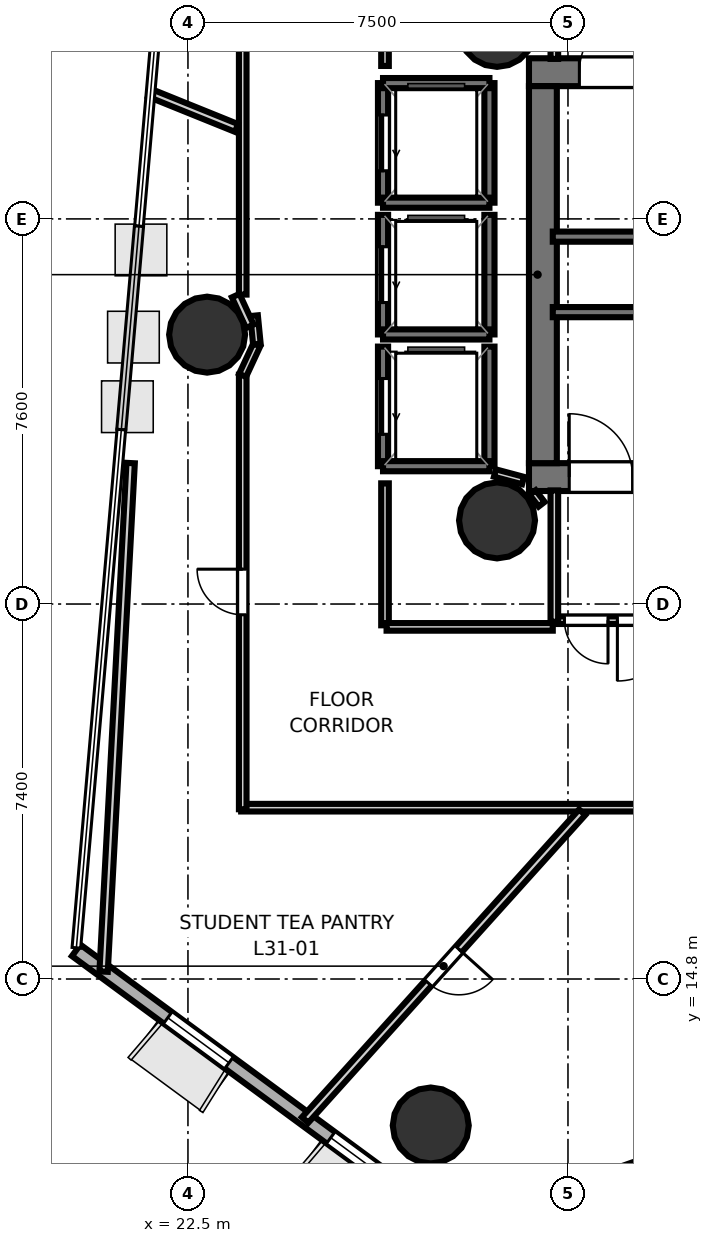
"""IFC4 building model, lengths in metres.
Left out: names, types, materials, properties, quantities, classifications, styles, units other than length and angle.
Written with IfcOpenShell. Run it as: python <this file> out.ifc"""

import sys

from ifc_helpers import new_model, si_unit, direction, frame, frame_2d, origin, origin_2d, place, context, subcontext, project, spatial, rectangle, hollow_circle, extrude, element, fill, save


model = new_model("IFC4")
c1 = context("Model", 3, precision=1e-05, world=origin(), true_north=direction((0.0, 1.0)))
c2 = subcontext(c1, "Body", "Model", "MODEL_VIEW")
j1 = project(units=[si_unit("LENGTHUNIT", "METRE"), si_unit("PLANEANGLEUNIT", "RADIAN")], contexts=[c1])
p1 = place(None, origin())
s1 = spatial("IfcSite", under=j1, at=p1, CompositionType="ELEMENT")
p2 = place(p1, origin())
s2 = spatial("IfcBuilding", under=s1, at=p2, CompositionType="ELEMENT")
p3 = place(p2, frame((0.0, 0.0, 123.7)))
s3 = spatial("IfcBuildingStorey", under=s2, at=p3, CompositionType="ELEMENT", Elevation=123.7)
p4 = place(p3, frame((29.23, 32.695, 0.0), z_axis=(0.0, 0.0, 1.0), x_axis=(1.0, 0.0, 0.0)))
e1 = element("IfcWall", 1, at=p4, inside=s3, PredefinedType="SHEAR", context=c2, shape_type="SweptSolid", body=[
    extrude(rectangle(XDim=10.62, YDim=0.55, at=frame_2d((5.31, 0.0))), origin(), (0.0, 0.0, 1.0), 3.52),
])
p5 = place(p4, frame((0.995, 0.0, 0.0)))
e2 = element("IfcOpeningElement", 2, at=p5, cuts=e1, PredefinedType="OPENING", context=c2, shape_type="SweptSolid", body=[
    extrude(rectangle(XDim=1.25, YDim=2.15, at=frame_2d((0.625, 1.075))), frame((0.0, 0.285, 0.0), z_axis=(0.0, -1.0, 0.0), x_axis=(1.0, 0.0, 0.0)), (0.0, 0.0, 1.0), 0.57),
])
p6 = place(p3, frame((29.23, 24.705, 0.0), z_axis=(0.0, 0.0, 1.0), x_axis=(1.0, 0.0, 0.0)))
e3 = element("IfcWall", 3, at=p6, inside=s3, PredefinedType="SHEAR", context=c2, shape_type="SweptSolid", body=[
    extrude(rectangle(XDim=10.62, YDim=0.55, at=frame_2d((5.31, 0.0))), origin(), (0.0, 0.0, 1.0), 3.52),
])
p7 = place(p6, frame((0.795, 0.0, 0.0)))
e4 = element("IfcOpeningElement", 4, at=p7, cuts=e3, PredefinedType="OPENING", context=c2, shape_type="SweptSolid", body=[
    extrude(rectangle(XDim=1.25, YDim=2.15, at=frame_2d((0.625, 1.075))), frame((0.0, 0.285, 0.0), z_axis=(0.0, -1.0, 0.0), x_axis=(1.0, 0.0, 0.0)), (0.0, 0.0, 1.0), 0.57),
])
p8 = place(p3, frame((29.505, 24.98, 0.0), z_axis=(0.0, 0.0, 1.0), x_axis=(0.0, 1.0, 0.0)))
e5 = element("IfcWall", 5, at=p8, inside=s3, PredefinedType="SHEAR", context=c2, shape_type="SweptSolid", body=[
    extrude(rectangle(XDim=7.44, YDim=0.55, at=frame_2d((3.72, 0.0))), origin(), (0.0, 0.0, 1.0), 3.52),
])
for number, where, z_axis, x_axis in (
    (6, (28.6, 33.55, 0.0), (0.0, 0.0, 1.0), (1.0, 0.0, 0.0)),
    (7, (28.6, 23.85, 0.0), (0.0, 0.0, 1.0), (1.0, 0.0, 0.0)),
    (8, (22.878, 27.516, 0.0), (0.0, 0.0, 1.0), (1.0, 0.0, 0.0)),
    (9, (27.292, 11.909, 0.0), (0.0, 0.0, 1.0), (1.0, 0.0, 0.0)),
):
    element("IfcColumn", number, at=place(p3, frame(where, z_axis=z_axis, x_axis=x_axis)), inside=s3, PredefinedType="COLUMN", context=c2, shape_type="SweptSolid", body=[
        extrude(hollow_circle(Radius=0.75, WallThickness=0.036, at=origin_2d()), origin(), (0.0, 0.0, 1.0), 3.7),
    ])
p9 = place(p3, frame((20.293, 15.366, 0.0), z_axis=(0.0, 0.0, 1.0), x_axis=(0.805460106815, -0.592649994794, 0.0)))
e10 = element("IfcWall", 10, at=p9, inside=s3, PredefinedType="SOLIDWALL", context=c2, shape_type="SweptSolid", body=[
    extrude(rectangle(XDim=9.983, YDim=0.28, at=frame_2d((4.992, 0.0))), origin(), (0.0, 0.0, 1.0), 3.52),
])
p10 = place(p9, frame((2.245, 0.0, 0.85)))
e11 = element("IfcOpeningElement", 11, at=p10, cuts=e10, PredefinedType="OPENING", context=c2, shape_type="SweptSolid", body=[
    extrude(rectangle(XDim=1.5, YDim=2.1, at=frame_2d((0.75, 1.05))), frame((0.0, 0.15, 0.0), z_axis=(0.0, -1.0, 0.0), x_axis=(1.0, 0.0, 0.0)), (0.0, 0.0, 1.0), 0.3),
])
p11 = place(p9, frame((6.238, 0.0, 0.85)))
e12 = element("IfcOpeningElement", 12, at=p11, cuts=e10, PredefinedType="OPENING", context=c2, shape_type="SweptSolid", body=[
    extrude(rectangle(XDim=1.5, YDim=2.1, at=frame_2d((0.75, 1.05))), frame((0.0, 0.15, 0.0), z_axis=(0.0, -1.0, 0.0), x_axis=(1.0, 0.0, 0.0)), (0.0, 0.0, 1.0), 0.3),
])
p12 = place(p3, frame((29.7, 29.45, 0.0), z_axis=(0.0, 0.0, 1.0), x_axis=(1.0, 0.0, 0.0)))
e13 = element("IfcWall", 13, at=p12, inside=s3, PredefinedType="SOLIDWALL", context=c2, shape_type="SweptSolid", body=[
    extrude(rectangle(XDim=8.3, YDim=0.2, at=frame_2d((4.15, 0.0))), origin(), (0.0, 0.0, 1.0), 3.52),
])
p13 = place(p3, frame((29.7, 27.96, 0.0), z_axis=(0.0, 0.0, 1.0), x_axis=(1.0, 0.0, 0.0)))
e14 = element("IfcWall", 14, at=p13, inside=s3, PredefinedType="SOLIDWALL", context=c2, shape_type="SweptSolid", body=[
    extrude(rectangle(XDim=7.75, YDim=0.2, at=frame_2d((3.875, 0.0))), origin(), (0.0, 0.0, 1.0), 3.52),
])
p14 = place(p3, frame((28.45, 30.12, 0.0), z_axis=(0.0, 0.0, 1.0), x_axis=(0.0, 1.0, 0.0)))
e15 = element("IfcWall", 15, at=p14, inside=s3, PredefinedType="SOLIDWALL", context=c2, shape_type="SweptSolid", body=[
    extrude(rectangle(XDim=2.36, YDim=0.2, at=frame_2d((1.18, 0.0))), origin(), (0.0, 0.0, 1.0), 3.52),
])
p15 = place(p3, frame((26.35, 30.12, 0.0), z_axis=(0.0, 0.0, 1.0), x_axis=(0.0, 1.0, 0.0)))
e16 = element("IfcWall", 16, at=p15, inside=s3, PredefinedType="SOLIDWALL", context=c2, shape_type="SweptSolid", body=[
    extrude(rectangle(XDim=2.36, YDim=0.2, at=frame_2d((1.18, 0.0))), origin(), (0.0, 0.0, 1.0), 3.52),
])
p16 = place(p15, frame((0.63, 0.0, 0.0)))
e17 = element("IfcOpeningElement", 17, at=p16, cuts=e16, PredefinedType="OPENING", context=c2, shape_type="SweptSolid", body=[
    extrude(rectangle(XDim=1.1, YDim=2.15, at=frame_2d((0.55, 1.075))), frame((0.0, 0.11, 0.0), z_axis=(0.0, -1.0, 0.0), x_axis=(1.0, 0.0, 0.0)), (0.0, 0.0, 1.0), 0.22),
])
for number, where, z_axis, x_axis in (
    (18, (26.35, 32.48, 0.0), (0.0, 0.0, 1.0), (1.0, 0.0, 0.0)),
    (19, (26.35, 30.12, 0.0), (0.0, 0.0, 1.0), (1.0, 0.0, 0.0)),
):
    element("IfcWall", number, at=place(p3, frame(where, z_axis=z_axis, x_axis=x_axis)), inside=s3, PredefinedType="SOLIDWALL", context=c2, shape_type="SweptSolid", body=[
        extrude(rectangle(XDim=2.1, YDim=0.2, at=frame_2d((1.05, 0.0))), origin(), (0.0, 0.0, 1.0), 3.52),
    ])
p17 = place(p3, frame((28.45, 27.52, 0.0), z_axis=(0.0, 0.0, 1.0), x_axis=(0.0, 1.0, 0.0)))
e20 = element("IfcWall", 20, at=p17, inside=s3, PredefinedType="SOLIDWALL", context=c2, shape_type="SweptSolid", body=[
    extrude(rectangle(XDim=2.36, YDim=0.2, at=frame_2d((1.18, 0.0))), origin(), (0.0, 0.0, 1.0), 3.52),
])
p18 = place(p3, frame((26.35, 27.52, 0.0), z_axis=(0.0, 0.0, 1.0), x_axis=(0.0, 1.0, 0.0)))
e21 = element("IfcWall", 21, at=p18, inside=s3, PredefinedType="SOLIDWALL", context=c2, shape_type="SweptSolid", body=[
    extrude(rectangle(XDim=2.36, YDim=0.2, at=frame_2d((1.18, 0.0))), origin(), (0.0, 0.0, 1.0), 3.52),
])
p19 = place(p18, frame((0.63, 0.0, 0.0)))
e22 = element("IfcOpeningElement", 22, at=p19, cuts=e21, PredefinedType="OPENING", context=c2, shape_type="SweptSolid", body=[
    extrude(rectangle(XDim=1.1, YDim=2.15, at=frame_2d((0.55, 1.075))), frame((0.0, 0.11, 0.0), z_axis=(0.0, -1.0, 0.0), x_axis=(1.0, 0.0, 0.0)), (0.0, 0.0, 1.0), 0.22),
])
p20 = place(p3, frame((26.35, 27.52, 0.0), z_axis=(0.0, 0.0, 1.0), x_axis=(1.0, 0.0, 0.0)))
e23 = element("IfcWall", 23, at=p20, inside=s3, PredefinedType="SOLIDWALL", context=c2, shape_type="SweptSolid", body=[
    extrude(rectangle(XDim=2.1, YDim=0.2, at=frame_2d((1.05, 0.0))), origin(), (0.0, 0.0, 1.0), 3.52),
])
p21 = place(p3, frame((28.45, 24.92, 0.0), z_axis=(0.0, 0.0, 1.0), x_axis=(0.0, 1.0, 0.0)))
e24 = element("IfcWall", 24, at=p21, inside=s3, PredefinedType="SOLIDWALL", context=c2, shape_type="SweptSolid", body=[
    extrude(rectangle(XDim=2.36, YDim=0.2, at=frame_2d((1.18, 0.0))), origin(), (0.0, 0.0, 1.0), 3.52),
])
p22 = place(p3, frame((26.35, 24.92, 0.0), z_axis=(0.0, 0.0, 1.0), x_axis=(0.0, 1.0, 0.0)))
e25 = element("IfcWall", 25, at=p22, inside=s3, PredefinedType="SOLIDWALL", context=c2, shape_type="SweptSolid", body=[
    extrude(rectangle(XDim=2.36, YDim=0.2, at=frame_2d((1.18, 0.0))), origin(), (0.0, 0.0, 1.0), 3.52),
])
p23 = place(p22, frame((0.63, 0.0, 0.0)))
e26 = element("IfcOpeningElement", 26, at=p23, cuts=e25, PredefinedType="OPENING", context=c2, shape_type="SweptSolid", body=[
    extrude(rectangle(XDim=1.1, YDim=2.15, at=frame_2d((0.55, 1.075))), frame((0.0, 0.11, 0.0), z_axis=(0.0, -1.0, 0.0), x_axis=(1.0, 0.0, 0.0)), (0.0, 0.0, 1.0), 0.22),
])
p24 = place(p3, frame((26.35, 24.92, 0.0), z_axis=(0.0, 0.0, 1.0), x_axis=(1.0, 0.0, 0.0)))
e27 = element("IfcWall", 27, at=p24, inside=s3, PredefinedType="SOLIDWALL", context=c2, shape_type="SweptSolid", body=[
    extrude(rectangle(XDim=2.1, YDim=0.2, at=frame_2d((1.05, 0.0))), origin(), (0.0, 0.0, 1.0), 3.52),
])
p25 = place(p3, frame((29.731, 32.958, 0.0), z_axis=(0.0, 0.0, 1.0), x_axis=(0.0, 1.0, 0.0)))
e28 = element("IfcWall", 28, at=p25, inside=s3, PredefinedType="PARTITIONING", context=c2, shape_type="SweptSolid", body=[
    extrude(rectangle(XDim=2.562, YDim=0.15, at=frame_2d((1.281, 0.0))), origin(), (0.0, 0.0, 1.0), 2.84),
])
p26 = place(p3, frame((33.45, 21.881, 0.0), z_axis=(0.0, 0.0, 1.0), x_axis=(-1.0, 0.0, 0.0)))
e29 = element("IfcWall", 29, at=p26, inside=s3, PredefinedType="PARTITIONING", context=c2, shape_type="SweptSolid", body=[
    extrude(rectangle(XDim=3.75, YDim=0.15, at=frame_2d((1.875, 0.0))), origin(), (0.0, 0.0, 1.0), 2.84),
])
p27 = place(p26, frame((1.275, 0.0, 0.0)))
e30 = element("IfcOpeningElement", 30, at=p27, cuts=e29, PredefinedType="OPENING", context=c2, shape_type="SweptSolid", body=[
    extrude(rectangle(XDim=1.2, YDim=2.15, at=frame_2d((0.6, 1.075))), frame((0.0, 0.085, 0.0), z_axis=(0.0, -1.0, 0.0), x_axis=(1.0, 0.0, 0.0)), (0.0, 0.0, 1.0), 0.17),
])
p28 = place(p26, frame((2.66, 0.0, 0.0)))
e31 = element("IfcOpeningElement", 31, at=p28, cuts=e29, PredefinedType="OPENING", context=c2, shape_type="SweptSolid", body=[
    extrude(rectangle(XDim=0.86, YDim=2.05, at=frame_2d((0.43, 1.025))), frame((0.0, 0.085, 0.0), z_axis=(0.0, -1.0, 0.0), x_axis=(1.0, 0.0, 0.0)), (0.0, 0.0, 1.0), 0.17),
])
p29 = place(p3, frame((29.731, 21.85, 0.0), z_axis=(0.0, 0.0, 1.0), x_axis=(0.0, 1.0, 0.0)))
e32 = element("IfcWall", 32, at=p29, inside=s3, PredefinedType="PARTITIONING", context=c2, shape_type="SweptSolid", body=[
    extrude(rectangle(XDim=2.592, YDim=0.15, at=frame_2d((1.296, 0.0))), origin(), (0.0, 0.0, 1.0), 2.84),
])
p30 = place(p3, frame((29.48, 24.169, 0.0), z_axis=(0.0, 0.0, 1.0), x_axis=(-0.608043045279, 0.79390405912, 0.0)))
e33 = element("IfcWall", 33, at=p30, inside=s3, PredefinedType="PARTITIONING", context=c2, shape_type="SweptSolid", body=[
    extrude(rectangle(XDim=0.29, YDim=0.15, at=frame_2d((0.145, 0.0))), origin(), (0.0, 0.0, 1.0), 2.84),
])
p31 = place(p3, frame((29.114, 24.637, 0.0), z_axis=(0.0, 0.0, 1.0), x_axis=(-0.966199685486, 0.257794817183, 0.0)))
e34 = element("IfcWall", 34, at=p31, inside=s3, PredefinedType="PARTITIONING", context=c2, shape_type="SweptSolid", body=[
    extrude(rectangle(XDim=0.575, YDim=0.15, at=frame_2d((0.288, 0.0))), origin(), (0.0, 0.0, 1.0), 2.84),
])
p32 = place(p3, frame((23.581, 28.307, 0.0), z_axis=(0.0, 0.0, 1.0), x_axis=(0.0, 1.0, 0.0)))
e35 = element("IfcWall", 35, at=p32, inside=s3, PredefinedType="PARTITIONING", context=c2, shape_type="SweptSolid", body=[
    extrude(rectangle(XDim=11.748, YDim=0.15, at=frame_2d((5.874, 0.0))), origin(), (0.0, 0.0, 1.0), 2.84),
])
p33 = place(p3, frame((26.389, 35.58, 0.0), z_axis=(0.0, 0.0, 1.0), x_axis=(0.0, -1.0, 0.0)))
e36 = element("IfcWall", 36, at=p33, inside=s3, PredefinedType="PARTITIONING", context=c2, shape_type="SweptSolid", body=[
    extrude(rectangle(XDim=2.761, YDim=0.15, at=frame_2d((1.381, 0.0))), origin(), (0.0, 0.0, 1.0), 2.84),
])
p34 = place(p3, frame((26.389, 24.581, 0.0), z_axis=(0.0, 0.0, 1.0), x_axis=(0.0, -1.0, 0.0)))
e37 = element("IfcWall", 37, at=p34, inside=s3, PredefinedType="PARTITIONING", context=c2, shape_type="SweptSolid", body=[
    extrude(rectangle(XDim=2.801, YDim=0.15, at=frame_2d((1.401, 0.0))), origin(), (0.0, 0.0, 1.0), 2.84),
])
p35 = place(p3, frame((26.42, 21.749, 0.0), z_axis=(0.0, 0.0, 1.0), x_axis=(1.0, 0.0, 0.0)))
e38 = element("IfcWall", 38, at=p35, inside=s3, PredefinedType="PARTITIONING", context=c2, shape_type="SweptSolid", body=[
    extrude(rectangle(XDim=3.28, YDim=0.15, at=frame_2d((1.64, 0.0))), origin(), (0.0, 0.0, 1.0), 2.84),
])
p36 = place(p3, frame((33.32, 18.181, 0.0), z_axis=(0.0, 0.0, 1.0), x_axis=(-1.0, 0.0, 0.0)))
e39 = element("IfcWall", 39, at=p36, inside=s3, PredefinedType="PARTITIONING", context=c2, shape_type="SweptSolid", body=[
    extrude(rectangle(XDim=9.77, YDim=0.15, at=frame_2d((4.885, 0.0))), origin(), (0.0, 0.0, 1.0), 2.84),
])
p37 = place(p3, frame((23.581, 18.15, 0.0), z_axis=(0.0, 0.0, 1.0), x_axis=(0.0, 1.0, 0.0)))
e40 = element("IfcWall", 40, at=p37, inside=s3, PredefinedType="PARTITIONING", context=c2, shape_type="SweptSolid", body=[
    extrude(rectangle(XDim=8.575, YDim=0.15, at=frame_2d((4.288, 0.0))), origin(), (0.0, 0.0, 1.0), 2.84),
])
p38 = place(p37, frame((3.838, 0.0, 0.0)))
e41 = element("IfcOpeningElement", 41, at=p38, cuts=e40, PredefinedType="OPENING", context=c2, shape_type="SweptSolid", body=[
    extrude(rectangle(XDim=0.9, YDim=2.1, at=frame_2d((0.45, 1.05))), frame((0.0, 0.085, 0.0), z_axis=(0.0, -1.0, 0.0), x_axis=(1.0, 0.0, 0.0)), (0.0, 0.0, 1.0), 0.17),
])
p39 = place(p3, frame((23.578, 26.712, 0.0), z_axis=(0.0, 0.0, 1.0), x_axis=(0.421251946418, 0.906943657367, 0.0)))
e42 = element("IfcWall", 42, at=p39, inside=s3, PredefinedType="PARTITIONING", context=c2, shape_type="SweptSolid", body=[
    extrude(rectangle(XDim=0.663, YDim=0.15, at=frame_2d((0.332, 0.0))), origin(), (0.0, 0.0, 1.0), 2.84),
])
p40 = place(p3, frame((23.86, 27.33, 0.0), z_axis=(0.0, 0.0, 1.0), x_axis=(-0.098000919071, 0.995186324193, 0.0)))
e43 = element("IfcWall", 43, at=p40, inside=s3, PredefinedType="PARTITIONING", context=c2, shape_type="SweptSolid", body=[
    extrude(rectangle(XDim=0.563, YDim=0.15, at=frame_2d((0.281, 0.0))), origin(), (0.0, 0.0, 1.0), 2.84),
])
p41 = place(p3, frame((21.743, 32.288, 0.0), z_axis=(0.0, 0.0, 1.0), x_axis=(0.927188084006, -0.374596125017, 0.0)))
e44 = element("IfcWall", 44, at=p41, inside=s3, PredefinedType="PLUMBINGWALL", context=c2, shape_type="SweptSolid", body=[
    extrude(rectangle(XDim=1.85, YDim=0.165, at=frame_2d((0.925, 0.0))), origin(), (0.0, 0.0, 1.0), 2.84),
])
p42 = place(p3, frame((23.442, 28.286, 0.0), z_axis=(0.0, 0.0, 1.0), x_axis=(0.41857044132, -0.908184334622, 0.0)))
e45 = element("IfcWall", 45, at=p42, inside=s3, PredefinedType="PLUMBINGWALL", context=c2, shape_type="SweptSolid", body=[
    extrude(rectangle(XDim=0.667, YDim=0.165, at=frame_2d((0.333, 0.0))), origin(), (0.0, 0.0, 1.0), 2.84),
])
p43 = place(p3, frame((30.28, 18.091, 0.0), z_axis=(0.0, 0.0, 1.0), x_axis=(-0.669142948904, -0.743133712014, 0.0)))
e46 = element("IfcWall", 46, at=p43, inside=s3, PredefinedType="PLUMBINGWALL", context=c2, shape_type="SweptSolid", body=[
    extrude(rectangle(XDim=8.173, YDim=0.165, at=frame_2d((4.086, 0.0))), origin(), (0.0, 0.0, 1.0), 2.84),
])
p44 = place(p43, frame((3.636, 0.0, 0.0)))
e47 = element("IfcOpeningElement", 47, at=p44, cuts=e46, PredefinedType="OPENING", context=c2, shape_type="SweptSolid", body=[
    extrude(rectangle(XDim=0.9, YDim=2.1, at=frame_2d((0.45, 1.05))), frame((0.0, 0.093, 0.0), z_axis=(0.0, -1.0, 0.0), x_axis=(1.0, 0.0, 0.0)), (0.0, 0.0, 1.0), 0.185),
])
p45 = place(p3, frame((20.835, 14.946, 0.0), z_axis=(0.0, 0.0, 1.0), x_axis=(0.053105834147, 0.998588889573, 0.0)))
e48 = element("IfcWall", 48, at=p45, inside=s3, PredefinedType="PLUMBINGWALL", context=c2, shape_type="SweptSolid", body=[
    extrude(rectangle(XDim=10.05, YDim=0.165, at=frame_2d((5.025, 0.0))), origin(), (0.0, 0.0, 1.0), 2.84),
])
p46 = place(p3, frame((57.438, 20.305, 0.0), z_axis=(0.0, 0.0, 1.0), x_axis=(-0.943260862514, -0.332052624216, 0.0)))
e49 = element("IfcWall", 49, at=p46, inside=s3, PredefinedType="PLUMBINGWALL", context=c2, shape_type="SweptSolid", body=[
    extrude(rectangle(XDim=31.186, YDim=0.165, at=frame_2d((15.593, 0.0))), origin(), (0.0, 0.0, 1.0), 2.84),
])
p47 = place(p5, origin())
e50 = element("IfcDoor", 50, at=p47, inside=s3, OperationType="SINGLE_SWING_RIGHT", PredefinedType="DOOR", context=c2, shape_type="SweptSolid", body=[
    extrude(rectangle(XDim=1.25, YDim=2.15, at=frame_2d((0.625, 1.075))), frame((0.0, 0.025, 0.0), z_axis=(0.0, -1.0, 0.0), x_axis=(1.0, 0.0, 0.0)), (0.0, 0.0, 1.0), 0.05),
])
fill(e2, e50)
p48 = place(p7, origin())
e51 = element("IfcDoor", 51, at=p48, inside=s3, OperationType="SINGLE_SWING_LEFT", PredefinedType="DOOR", context=c2, shape_type="SweptSolid", body=[
    extrude(rectangle(XDim=1.25, YDim=2.15, at=frame_2d((0.625, 1.075))), frame((0.0, 0.025, 0.0), z_axis=(0.0, -1.0, 0.0), x_axis=(1.0, 0.0, 0.0)), (0.0, 0.0, 1.0), 0.05),
])
fill(e4, e51)
p49 = place(p16, origin())
e52 = element("IfcDoor", 52, at=p49, inside=s3, OperationType="SLIDING_TO_LEFT", PredefinedType="DOOR", context=c2, shape_type="SweptSolid", body=[
    extrude(rectangle(XDim=1.1, YDim=2.15, at=frame_2d((0.55, 1.075))), frame((0.0, 0.025, 0.0), z_axis=(0.0, -1.0, 0.0), x_axis=(1.0, 0.0, 0.0)), (0.0, 0.0, 1.0), 0.05),
])
fill(e17, e52)
p50 = place(p19, origin())
e53 = element("IfcDoor", 53, at=p50, inside=s3, OperationType="SLIDING_TO_LEFT", PredefinedType="DOOR", context=c2, shape_type="SweptSolid", body=[
    extrude(rectangle(XDim=1.1, YDim=2.15, at=frame_2d((0.55, 1.075))), frame((0.0, 0.025, 0.0), z_axis=(0.0, -1.0, 0.0), x_axis=(1.0, 0.0, 0.0)), (0.0, 0.0, 1.0), 0.05),
])
fill(e22, e53)
p51 = place(p23, origin())
e54 = element("IfcDoor", 54, at=p51, inside=s3, OperationType="SLIDING_TO_LEFT", PredefinedType="DOOR", context=c2, shape_type="SweptSolid", body=[
    extrude(rectangle(XDim=1.1, YDim=2.15, at=frame_2d((0.55, 1.075))), frame((0.0, 0.025, 0.0), z_axis=(0.0, -1.0, 0.0), x_axis=(1.0, 0.0, 0.0)), (0.0, 0.0, 1.0), 0.05),
])
fill(e26, e54)
p52 = place(p27, origin())
e55 = element("IfcDoor", 55, at=p52, inside=s3, OperationType="SINGLE_SWING_RIGHT", PredefinedType="DOOR", context=c2, shape_type="SweptSolid", body=[
    extrude(rectangle(XDim=1.2, YDim=2.15, at=frame_2d((0.6, 1.075))), frame((0.0, 0.025, 0.0), z_axis=(0.0, -1.0, 0.0), x_axis=(1.0, 0.0, 0.0)), (0.0, 0.0, 1.0), 0.05),
])
fill(e30, e55)
p53 = place(p28, origin())
e56 = element("IfcDoor", 56, at=p53, inside=s3, OperationType="SINGLE_SWING_LEFT", PredefinedType="DOOR", context=c2, shape_type="SweptSolid", body=[
    extrude(rectangle(XDim=0.86, YDim=2.05, at=frame_2d((0.43, 1.025))), frame((0.0, 0.025, 0.0), z_axis=(0.0, -1.0, 0.0), x_axis=(1.0, 0.0, 0.0)), (0.0, 0.0, 1.0), 0.05),
])
fill(e31, e56)
p54 = place(p38, origin())
e57 = element("IfcDoor", 57, at=p54, inside=s3, OperationType="SINGLE_SWING_RIGHT", PredefinedType="DOOR", context=c2, shape_type="SweptSolid", body=[
    extrude(rectangle(XDim=0.9, YDim=2.1, at=frame_2d((0.45, 1.05))), frame((0.0, 0.025, 0.0), z_axis=(0.0, -1.0, 0.0), x_axis=(1.0, 0.0, 0.0)), (0.0, 0.0, 1.0), 0.05),
])
fill(e41, e57)
p55 = place(p44, origin())
e58 = element("IfcDoor", 58, at=p55, inside=s3, OperationType="SINGLE_SWING_LEFT", PredefinedType="DOOR", context=c2, shape_type="SweptSolid", body=[
    extrude(rectangle(XDim=0.9, YDim=2.1, at=frame_2d((0.45, 1.05))), frame((0.0, 0.025, 0.0), z_axis=(0.0, -1.0, 0.0), x_axis=(1.0, 0.0, 0.0)), (0.0, 0.0, 1.0), 0.05),
])
fill(e47, e58)
p56 = place(p10, origin())
e59 = element("IfcWindow", 59, at=p56, inside=s3, PartitioningType="SINGLE_PANEL", PredefinedType="WINDOW", context=c2, shape_type="SweptSolid", body=[
    extrude(rectangle(XDim=1.5, YDim=2.1, at=frame_2d((0.75, 1.05))), frame((0.0, 0.03, 0.0), z_axis=(0.0, -1.0, 0.0), x_axis=(1.0, 0.0, 0.0)), (0.0, 0.0, 1.0), 0.06),
])
fill(e11, e59)
p57 = place(p11, origin())
e60 = element("IfcWindow", 60, at=p57, inside=s3, PartitioningType="SINGLE_PANEL", PredefinedType="WINDOW", context=c2, shape_type="SweptSolid", body=[
    extrude(rectangle(XDim=1.5, YDim=2.1, at=frame_2d((0.75, 1.05))), frame((0.0, 0.03, 0.0), z_axis=(0.0, -1.0, 0.0), x_axis=(1.0, 0.0, 0.0)), (0.0, 0.0, 1.0), 0.06),
])
fill(e12, e60)
save(model, sys.argv[1])
